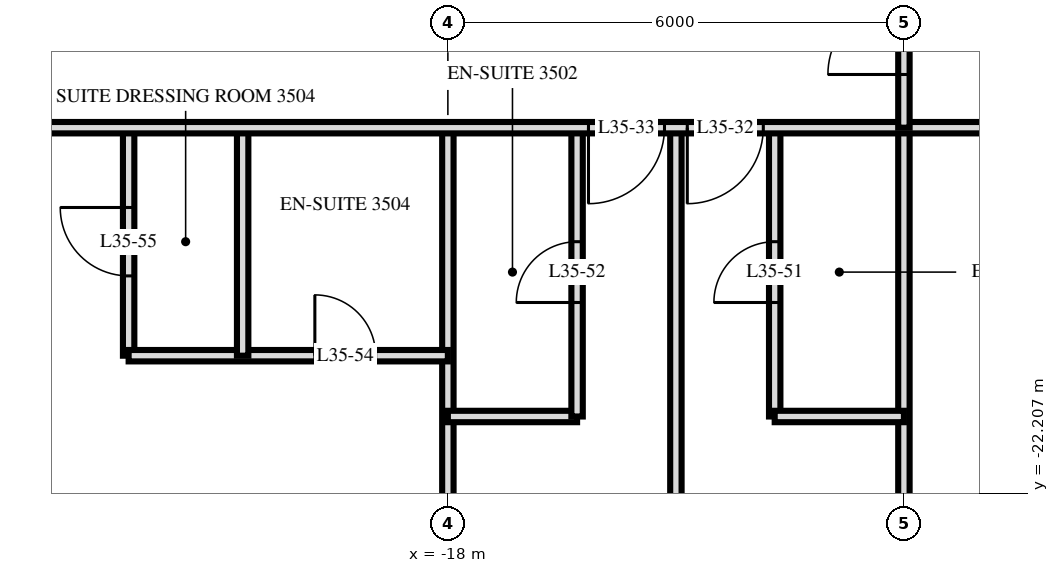
"""IFC4 building model, lengths in metres.
Left out: names, types, materials, properties, quantities, classifications, styles, units other than length and angle.
Written with IfcOpenShell. Run it as: python <this file> out.ifc"""

import sys

from ifc_helpers import new_model, si_unit, direction, frame, frame_2d, origin, place, context, subcontext, project, spatial, rectangle, extrude, element, fill, save


model = new_model("IFC4")
c1 = context("Model", 3, precision=1e-05, world=origin(), true_north=direction((0.0, 1.0)))
c2 = subcontext(c1, "Body", "Model", "MODEL_VIEW")
j1 = project(units=[si_unit("LENGTHUNIT", "METRE"), si_unit("PLANEANGLEUNIT", "RADIAN")], contexts=[c1])
p1 = place(None, origin())
s1 = spatial("IfcSite", under=j1, at=p1, CompositionType="ELEMENT")
p2 = place(p1, origin())
s2 = spatial("IfcBuilding", under=s1, at=p2, CompositionType="ELEMENT")
p3 = place(p2, frame((0.0, 0.0, 138.0)))
s3 = spatial("IfcBuildingStorey", under=s2, at=p3, CompositionType="ELEMENT", Elevation=138.0)
p4 = place(p3, frame((-12.0, -17.4, 0.0), z_axis=(0.0, 0.0, 1.0), x_axis=(0.0, 1.0, 0.0)))
e1 = element("IfcWall", 1, at=p4, inside=s3, PredefinedType="PARTITIONING", context=c2, shape_type="SweptSolid", body=[
    extrude(rectangle(XDim=2.35, YDim=0.15, at=frame_2d((1.175, 0.0))), origin(), (0.0, 0.0, 1.0), 3.32),
])
p5 = place(p4, frame((0.7, 0.0, 0.0)))
e2 = element("IfcOpeningElement", 2, at=p5, cuts=e1, PredefinedType="OPENING", context=c2, shape_type="SweptSolid", body=[
    extrude(rectangle(XDim=1.0, YDim=2.1, at=frame_2d((0.5, 1.05))), frame((0.0, 0.085, 0.0), z_axis=(0.0, -1.0, 0.0), x_axis=(1.0, 0.0, 0.0)), (0.0, 0.0, 1.0), 0.17),
])
p6 = place(p3, frame((-12.0, -33.62, 0.0), z_axis=(0.0, 0.0, 1.0), x_axis=(0.0, 1.0, 0.0)))
e3 = element("IfcWall", 3, at=p6, inside=s3, PredefinedType="PARTITIONING", context=c2, shape_type="SweptSolid", body=[
    extrude(rectangle(XDim=16.22, YDim=0.15, at=frame_2d((8.11, 0.0))), origin(), (0.0, 0.0, 1.0), 3.32),
])
p7 = place(p3, frame((-13.7, -21.2, 0.0), z_axis=(0.0, 0.0, 1.0), x_axis=(0.0, 1.0, 0.0)))
e4 = element("IfcWall", 4, at=p7, inside=s3, PredefinedType="PARTITIONING", context=c2, shape_type="SweptSolid", body=[
    extrude(rectangle(XDim=3.8, YDim=0.15, at=frame_2d((1.9, 0.0))), origin(), (0.0, 0.0, 1.0), 3.32),
])
p8 = place(p7, frame((1.5, 0.0, 0.0)))
e5 = element("IfcOpeningElement", 5, at=p8, cuts=e4, PredefinedType="OPENING", context=c2, shape_type="SweptSolid", body=[
    extrude(rectangle(XDim=0.8, YDim=2.1, at=frame_2d((0.4, 1.05))), frame((0.0, 0.085, 0.0), z_axis=(0.0, -1.0, 0.0), x_axis=(1.0, 0.0, 0.0)), (0.0, 0.0, 1.0), 0.17),
])
p9 = place(p3, frame((-15.0, -33.62, 0.0), z_axis=(0.0, 0.0, 1.0), x_axis=(0.0, 1.0, 0.0)))
e6 = element("IfcWall", 6, at=p9, inside=s3, PredefinedType="PARTITIONING", context=c2, shape_type="SweptSolid", body=[
    extrude(rectangle(XDim=16.22, YDim=0.15, at=frame_2d((8.11, 0.0))), origin(), (0.0, 0.0, 1.0), 3.32),
])
p10 = place(p3, frame((-16.3, -21.2, 0.0), z_axis=(0.0, 0.0, 1.0), x_axis=(0.0, 1.0, 0.0)))
e7 = element("IfcWall", 7, at=p10, inside=s3, PredefinedType="PARTITIONING", context=c2, shape_type="SweptSolid", body=[
    extrude(rectangle(XDim=3.8, YDim=0.15, at=frame_2d((1.9, 0.0))), origin(), (0.0, 0.0, 1.0), 3.32),
])
p11 = place(p10, frame((1.5, 0.0, 0.0)))
e8 = element("IfcOpeningElement", 8, at=p11, cuts=e7, PredefinedType="OPENING", context=c2, shape_type="SweptSolid", body=[
    extrude(rectangle(XDim=0.8, YDim=2.1, at=frame_2d((0.4, 1.05))), frame((0.0, 0.085, 0.0), z_axis=(0.0, -1.0, 0.0), x_axis=(1.0, 0.0, 0.0)), (0.0, 0.0, 1.0), 0.17),
])
p12 = place(p3, frame((-18.0, -33.62, 0.0), z_axis=(0.0, 0.0, 1.0), x_axis=(0.0, 1.0, 0.0)))
e9 = element("IfcWall", 9, at=p12, inside=s3, PredefinedType="PARTITIONING", context=c2, shape_type="SweptSolid", body=[
    extrude(rectangle(XDim=16.22, YDim=0.15, at=frame_2d((8.11, 0.0))), origin(), (0.0, 0.0, 1.0), 3.32),
])
p13 = place(p3, frame((-20.7, -20.4, 0.0), z_axis=(0.0, 0.0, 1.0), x_axis=(0.0, 1.0, 0.0)))
e10 = element("IfcWall", 10, at=p13, inside=s3, PredefinedType="PARTITIONING", context=c2, shape_type="SweptSolid", body=[
    extrude(rectangle(XDim=3.0, YDim=0.15, at=frame_2d((1.5, 0.0))), origin(), (0.0, 0.0, 1.0), 3.32),
])
p14 = place(p3, frame((-22.2, -20.4, 0.0), z_axis=(0.0, 0.0, 1.0), x_axis=(0.0, 1.0, 0.0)))
e11 = element("IfcWall", 11, at=p14, inside=s3, PredefinedType="PARTITIONING", context=c2, shape_type="SweptSolid", body=[
    extrude(rectangle(XDim=3.0, YDim=0.15, at=frame_2d((1.5, 0.0))), origin(), (0.0, 0.0, 1.0), 3.32),
])
p15 = place(p14, frame((1.05, 0.0, 0.0)))
e12 = element("IfcOpeningElement", 12, at=p15, cuts=e11, PredefinedType="OPENING", context=c2, shape_type="SweptSolid", body=[
    extrude(rectangle(XDim=0.9, YDim=2.1, at=frame_2d((0.45, 1.05))), frame((0.0, 0.085, 0.0), z_axis=(0.0, -1.0, 0.0), x_axis=(1.0, 0.0, 0.0)), (0.0, 0.0, 1.0), 0.17),
])
for number, where, z_axis, x_axis in (
    (13, (-18.0, -21.2, 0.0), (0.0, 0.0, 1.0), (1.0, 0.0, 0.0)),
    (14, (-13.7, -21.2, 0.0), (0.0, 0.0, 1.0), (1.0, 0.0, 0.0)),
):
    element("IfcWall", number, at=place(p3, frame(where, z_axis=z_axis, x_axis=x_axis)), inside=s3, PredefinedType="PARTITIONING", context=c2, shape_type="SweptSolid", body=[
        extrude(rectangle(XDim=1.7, YDim=0.15, at=frame_2d((0.85, 0.0))), origin(), (0.0, 0.0, 1.0), 3.32),
    ])
p16 = place(p3, frame((-22.2, -20.4, 0.0), z_axis=(0.0, 0.0, 1.0), x_axis=(1.0, 0.0, 0.0)))
e15 = element("IfcWall", 15, at=p16, inside=s3, PredefinedType="PARTITIONING", context=c2, shape_type="SweptSolid", body=[
    extrude(rectangle(XDim=4.2, YDim=0.15, at=frame_2d((2.1, 0.0))), origin(), (0.0, 0.0, 1.0), 3.32),
])
p17 = place(p16, frame((2.45, 0.0, 0.0)))
e16 = element("IfcOpeningElement", 16, at=p17, cuts=e15, PredefinedType="OPENING", context=c2, shape_type="SweptSolid", body=[
    extrude(rectangle(XDim=0.8, YDim=2.1, at=frame_2d((0.4, 1.05))), frame((0.0, 0.085, 0.0), z_axis=(0.0, -1.0, 0.0), x_axis=(1.0, 0.0, 0.0)), (0.0, 0.0, 1.0), 0.17),
])
p18 = place(p3, frame((-28.02, -17.4, 0.0), z_axis=(0.0, 0.0, 1.0), x_axis=(1.0, 0.0, 0.0)))
e17 = element("IfcWall", 17, at=p18, inside=s3, PredefinedType="PARTITIONING", context=c2, shape_type="SweptSolid", body=[
    extrude(rectangle(XDim=56.04, YDim=0.15, at=frame_2d((28.02, 0.0))), origin(), (0.0, 0.0, 1.0), 3.32),
])
p19 = place(p18, frame((13.17, 0.0, 0.0)))
e18 = element("IfcOpeningElement", 18, at=p19, cuts=e17, PredefinedType="OPENING", context=c2, shape_type="SweptSolid", body=[
    extrude(rectangle(XDim=1.0, YDim=2.1, at=frame_2d((0.5, 1.05))), frame((0.0, 0.085, 0.0), z_axis=(0.0, -1.0, 0.0), x_axis=(1.0, 0.0, 0.0)), (0.0, 0.0, 1.0), 0.17),
])
p20 = place(p18, frame((11.87, 0.0, 0.0)))
e19 = element("IfcOpeningElement", 19, at=p20, cuts=e17, PredefinedType="OPENING", context=c2, shape_type="SweptSolid", body=[
    extrude(rectangle(XDim=1.0, YDim=2.1, at=frame_2d((0.5, 1.05))), frame((0.0, 0.085, 0.0), z_axis=(0.0, -1.0, 0.0), x_axis=(1.0, 0.0, 0.0)), (0.0, 0.0, 1.0), 0.17),
])
p21 = place(p18, frame((2.32, 0.0, 0.0)))
e20 = element("IfcOpeningElement", 20, at=p21, cuts=e17, PredefinedType="OPENING", context=c2, shape_type="SweptSolid", body=[
    extrude(rectangle(XDim=1.0, YDim=2.1, at=frame_2d((0.5, 1.05))), frame((0.0, 0.085, 0.0), z_axis=(0.0, -1.0, 0.0), x_axis=(1.0, 0.0, 0.0)), (0.0, 0.0, 1.0), 0.17),
])
p22 = place(p18, frame((40.17, 0.0, 0.0)))
e21 = element("IfcOpeningElement", 21, at=p22, cuts=e17, PredefinedType="OPENING", context=c2, shape_type="SweptSolid", body=[
    extrude(rectangle(XDim=1.0, YDim=2.1, at=frame_2d((0.5, 1.05))), frame((0.0, 0.085, 0.0), z_axis=(0.0, -1.0, 0.0), x_axis=(1.0, 0.0, 0.0)), (0.0, 0.0, 1.0), 0.17),
])
p23 = place(p18, frame((51.22, 0.0, 0.0)))
e22 = element("IfcOpeningElement", 22, at=p23, cuts=e17, PredefinedType="OPENING", context=c2, shape_type="SweptSolid", body=[
    extrude(rectangle(XDim=1.0, YDim=2.1, at=frame_2d((0.5, 1.05))), frame((0.0, 0.085, 0.0), z_axis=(0.0, -1.0, 0.0), x_axis=(1.0, 0.0, 0.0)), (0.0, 0.0, 1.0), 0.17),
])
p24 = place(p18, frame((18.52, 0.0, 0.0)))
e23 = element("IfcOpeningElement", 23, at=p24, cuts=e17, PredefinedType="OPENING", context=c2, shape_type="SweptSolid", body=[
    extrude(rectangle(XDim=1.0, YDim=2.1, at=frame_2d((0.5, 1.05))), frame((0.0, 0.085, 0.0), z_axis=(0.0, -1.0, 0.0), x_axis=(1.0, 0.0, 0.0)), (0.0, 0.0, 1.0), 0.17),
])
p25 = place(p18, frame((26.02, 0.0, 0.0)))
e24 = element("IfcOpeningElement", 24, at=p25, cuts=e17, PredefinedType="OPENING", context=c2, shape_type="SweptSolid", body=[
    extrude(rectangle(XDim=1.0, YDim=2.1, at=frame_2d((0.5, 1.05))), frame((0.0, 0.085, 0.0), z_axis=(0.0, -1.0, 0.0), x_axis=(1.0, 0.0, 0.0)), (0.0, 0.0, 1.0), 0.17),
])
p26 = place(p18, frame((35.02, 0.0, 0.0)))
e25 = element("IfcOpeningElement", 25, at=p26, cuts=e17, PredefinedType="OPENING", context=c2, shape_type="SweptSolid", body=[
    extrude(rectangle(XDim=1.0, YDim=2.1, at=frame_2d((0.5, 1.05))), frame((0.0, 0.085, 0.0), z_axis=(0.0, -1.0, 0.0), x_axis=(1.0, 0.0, 0.0)), (0.0, 0.0, 1.0), 0.17),
])
p27 = place(p5, origin())
e26 = element("IfcDoor", 26, at=p27, inside=s3, OperationType="SINGLE_SWING_RIGHT", PredefinedType="DOOR", context=c2, shape_type="SweptSolid", body=[
    extrude(rectangle(XDim=1.0, YDim=2.1, at=frame_2d((0.5, 1.05))), frame((0.0, 0.025, 0.0), z_axis=(0.0, -1.0, 0.0), x_axis=(1.0, 0.0, 0.0)), (0.0, 0.0, 1.0), 0.05),
])
fill(e2, e26)
p28 = place(p19, frame((0.5, 0.0, 0.0), z_axis=(0.0, 0.0, 1.0), x_axis=(-1.0, 0.0, 0.0)))
e27 = element("IfcDoor", 27, at=p28, inside=s3, OperationType="SINGLE_SWING_LEFT", PredefinedType="DOOR", context=c2, shape_type="SweptSolid", body=[
    extrude(rectangle(XDim=1.0, YDim=2.1, at=frame_2d((0.0, 1.05))), frame((0.0, -0.025, 0.0), z_axis=(0.0, 1.0, 0.0), x_axis=(-1.0, 0.0, 0.0)), (0.0, 0.0, 1.0), 0.05),
])
fill(e18, e27)
p29 = place(p20, frame((0.5, 0.0, 0.0), z_axis=(0.0, 0.0, 1.0), x_axis=(-1.0, 0.0, 0.0)))
e28 = element("IfcDoor", 28, at=p29, inside=s3, OperationType="SINGLE_SWING_LEFT", PredefinedType="DOOR", context=c2, shape_type="SweptSolid", body=[
    extrude(rectangle(XDim=1.0, YDim=2.1, at=frame_2d((0.0, 1.05))), frame((0.0, -0.025, 0.0), z_axis=(0.0, 1.0, 0.0), x_axis=(-1.0, 0.0, 0.0)), (0.0, 0.0, 1.0), 0.05),
])
fill(e19, e28)
p30 = place(p8, origin())
e29 = element("IfcDoor", 29, at=p30, inside=s3, OperationType="SINGLE_SWING_RIGHT", PredefinedType="DOOR", context=c2, shape_type="SweptSolid", body=[
    extrude(rectangle(XDim=0.8, YDim=2.1, at=frame_2d((0.4, 1.05))), frame((0.0, 0.025, 0.0), z_axis=(0.0, -1.0, 0.0), x_axis=(1.0, 0.0, 0.0)), (0.0, 0.0, 1.0), 0.05),
])
fill(e5, e29)
p31 = place(p11, origin())
e30 = element("IfcDoor", 30, at=p31, inside=s3, OperationType="SINGLE_SWING_RIGHT", PredefinedType="DOOR", context=c2, shape_type="SweptSolid", body=[
    extrude(rectangle(XDim=0.8, YDim=2.1, at=frame_2d((0.4, 1.05))), frame((0.0, 0.025, 0.0), z_axis=(0.0, -1.0, 0.0), x_axis=(1.0, 0.0, 0.0)), (0.0, 0.0, 1.0), 0.05),
])
fill(e8, e30)
p32 = place(p17, origin())
e31 = element("IfcDoor", 31, at=p32, inside=s3, OperationType="SINGLE_SWING_RIGHT", PredefinedType="DOOR", context=c2, shape_type="SweptSolid", body=[
    extrude(rectangle(XDim=0.8, YDim=2.1, at=frame_2d((0.4, 1.05))), frame((0.0, 0.025, 0.0), z_axis=(0.0, -1.0, 0.0), x_axis=(1.0, 0.0, 0.0)), (0.0, 0.0, 1.0), 0.05),
])
fill(e16, e31)
p33 = place(p15, origin())
e32 = element("IfcDoor", 32, at=p33, inside=s3, OperationType="SINGLE_SWING_LEFT", PredefinedType="DOOR", context=c2, shape_type="SweptSolid", body=[
    extrude(rectangle(XDim=0.9, YDim=2.1, at=frame_2d((0.45, 1.05))), frame((0.0, 0.025, 0.0), z_axis=(0.0, -1.0, 0.0), x_axis=(1.0, 0.0, 0.0)), (0.0, 0.0, 1.0), 0.05),
])
fill(e12, e32)
save(model, sys.argv[1])
